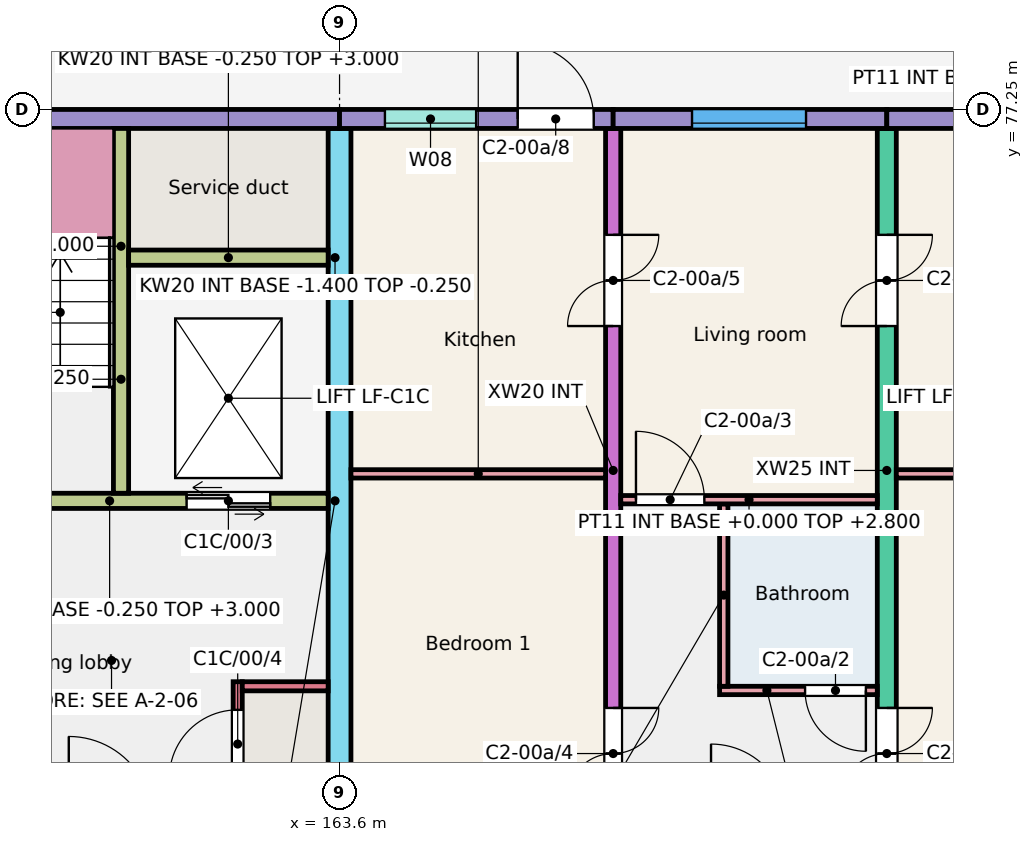
"""IFC4 building model, lengths in metres.
Left out: names, types, materials, properties, quantities, classifications, styles, units other than length and angle.
Written with IfcOpenShell. Run it as: python <this file> out.ifc"""

import sys

from ifc_helpers import new_model, si_unit, direction, frame, frame_2d, origin, place, context, subcontext, project, spatial, rectangle, extrude, element, fill, save


model = new_model("IFC4")
c1 = context("Model", 3, precision=1e-05, world=origin(), true_north=direction((0.0, 1.0)))
c2 = subcontext(c1, "Body", "Model", "MODEL_VIEW")
j1 = project(units=[si_unit("LENGTHUNIT", "METRE"), si_unit("PLANEANGLEUNIT", "RADIAN")], contexts=[c1])
p1 = place(None, origin())
s1 = spatial("IfcSite", under=j1, at=p1, CompositionType="ELEMENT")
p2 = place(p1, origin())
s2 = spatial("IfcBuilding", under=s1, at=p2, CompositionType="ELEMENT")
p3 = place(p2, origin())
s3 = spatial("IfcBuildingStorey", under=s2, at=p3, CompositionType="ELEMENT", Elevation=0.0)
p4 = place(p3, frame((163.6, 66.0, -0.25), z_axis=(0.0, 0.0, 1.0), x_axis=(0.0, 1.0, 0.0)))
e1 = element("IfcWall", 1, at=p4, inside=s3, PredefinedType="SHEAR", context=c2, shape_type="SweptSolid", body=[
    extrude(rectangle(XDim=11.0, YDim=0.3, at=frame_2d((5.5, 0.0))), origin(), (0.0, 0.0, 1.0), 3.25),
])
p5 = place(p4, frame((0.3, 0.0, 0.25)))
e2 = element("IfcOpeningElement", 2, at=p5, cuts=e1, PredefinedType="OPENING", context=c2, shape_type="SweptSolid", body=[
    extrude(rectangle(XDim=1.2, YDim=2.1, at=frame_2d((0.6, 1.05))), frame((0.0, 0.16, 0.0), z_axis=(0.0, -1.0, 0.0), x_axis=(1.0, 0.0, 0.0)), (0.0, 0.0, 1.0), 0.32),
])
p6 = place(p3, frame((167.2, 68.0, -0.25), z_axis=(0.0, 0.0, 1.0), x_axis=(0.0, 1.0, 0.0)))
e3 = element("IfcWall", 3, at=p6, inside=s3, PredefinedType="SHEAR", context=c2, shape_type="SweptSolid", body=[
    extrude(rectangle(XDim=9.0, YDim=0.2, at=frame_2d((4.5, 0.0))), origin(), (0.0, 0.0, 1.0), 3.25),
])
p7 = place(p6, frame((0.175, 0.0, 0.25)))
e4 = element("IfcOpeningElement", 4, at=p7, cuts=e3, PredefinedType="OPENING", context=c2, shape_type="SweptSolid", body=[
    extrude(rectangle(XDim=1.2, YDim=2.1, at=frame_2d((0.6, 1.05))), frame((0.0, 0.11, 0.0), z_axis=(0.0, -1.0, 0.0), x_axis=(1.0, 0.0, 0.0)), (0.0, 0.0, 1.0), 0.22),
])
p8 = place(p6, frame((6.4, 0.0, 0.25)))
e5 = element("IfcOpeningElement", 5, at=p8, cuts=e3, PredefinedType="OPENING", context=c2, shape_type="SweptSolid", body=[
    extrude(rectangle(XDim=1.2, YDim=2.1, at=frame_2d((0.6, 1.05))), frame((0.0, 0.11, 0.0), z_axis=(0.0, -1.0, 0.0), x_axis=(1.0, 0.0, 0.0)), (0.0, 0.0, 1.0), 0.22),
])
p9 = place(p3, frame((170.8, 68.0, -0.25), z_axis=(0.0, 0.0, 1.0), x_axis=(0.0, 1.0, 0.0)))
e6 = element("IfcWall", 6, at=p9, inside=s3, PredefinedType="SHEAR", context=c2, shape_type="SweptSolid", body=[
    extrude(rectangle(XDim=9.0, YDim=0.25, at=frame_2d((4.5, 0.0))), origin(), (0.0, 0.0, 1.0), 3.25),
])
p10 = place(p9, frame((0.175, 0.0, 0.25)))
e7 = element("IfcOpeningElement", 7, at=p10, cuts=e6, PredefinedType="OPENING", context=c2, shape_type="SweptSolid", body=[
    extrude(rectangle(XDim=1.2, YDim=2.1, at=frame_2d((0.6, 1.05))), frame((0.0, 0.135, 0.0), z_axis=(0.0, -1.0, 0.0), x_axis=(1.0, 0.0, 0.0)), (0.0, 0.0, 1.0), 0.27),
])
p11 = place(p9, frame((6.4, 0.0, 0.25)))
e8 = element("IfcOpeningElement", 8, at=p11, cuts=e6, PredefinedType="OPENING", context=c2, shape_type="SweptSolid", body=[
    extrude(rectangle(XDim=1.2, YDim=2.1, at=frame_2d((0.6, 1.05))), frame((0.0, 0.135, 0.0), z_axis=(0.0, -1.0, 0.0), x_axis=(1.0, 0.0, 0.0)), (0.0, 0.0, 1.0), 0.27),
])
p12 = place(p3, frame((157.6, 77.125, -0.25), z_axis=(0.0, 0.0, 1.0), x_axis=(1.0, 0.0, 0.0)))
e9 = element("IfcWall", 9, at=p12, inside=s3, PredefinedType="SOLIDWALL", context=c2, shape_type="SweptSolid", body=[
    extrude(rectangle(XDim=6.0, YDim=0.25, at=frame_2d((3.0, 0.0))), origin(), (0.0, 0.0, 1.0), 3.25),
])
p13 = place(p12, frame((1.025, 0.0, 0.25)))
e10 = element("IfcOpeningElement", 10, at=p13, cuts=e9, PredefinedType="OPENING", context=c2, shape_type="SweptSolid", body=[
    extrude(rectangle(XDim=1.1, YDim=2.1, at=frame_2d((0.55, 1.05))), frame((0.0, 0.135, 0.0), z_axis=(0.0, -1.0, 0.0), x_axis=(1.0, 0.0, 0.0)), (0.0, 0.0, 1.0), 0.27),
])
p14 = place(p3, frame((157.725, 72.1, -0.25), z_axis=(0.0, 0.0, 1.0), x_axis=(1.0, 0.0, 0.0)))
e11 = element("IfcWall", 11, at=p14, inside=s3, PredefinedType="SHEAR", context=c2, shape_type="SweptSolid", body=[
    extrude(rectangle(XDim=5.725, YDim=0.2, at=frame_2d((2.862, 0.0))), origin(), (0.0, 0.0, 1.0), 3.25),
])
p15 = place(p14, frame((0.95, 0.0, 0.25)))
e12 = element("IfcOpeningElement", 12, at=p15, cuts=e11, PredefinedType="OPENING", context=c2, shape_type="SweptSolid", body=[
    extrude(rectangle(XDim=1.0, YDim=2.1, at=frame_2d((0.5, 1.05))), frame((0.0, 0.11, 0.0), z_axis=(0.0, -1.0, 0.0), x_axis=(1.0, 0.0, 0.0)), (0.0, 0.0, 1.0), 0.22),
])
p16 = place(p14, frame((3.863, 0.0, 0.25)))
e13 = element("IfcOpeningElement", 13, at=p16, cuts=e11, PredefinedType="OPENING", context=c2, shape_type="SweptSolid", body=[
    extrude(rectangle(XDim=1.1, YDim=2.1, at=frame_2d((0.55, 1.05))), frame((0.0, 0.11, 0.0), z_axis=(0.0, -1.0, 0.0), x_axis=(1.0, 0.0, 0.0)), (0.0, 0.0, 1.0), 0.22),
])
p17 = place(p3, frame((160.725, 72.2, -0.25), z_axis=(0.0, 0.0, 1.0), x_axis=(0.0, 1.0, 0.0)))
e14 = element("IfcWall", 14, at=p17, inside=s3, PredefinedType="SHEAR", context=c2, shape_type="SweptSolid", body=[
    extrude(rectangle(XDim=4.8, YDim=0.2, at=frame_2d((2.4, 0.0))), origin(), (0.0, 0.0, 1.0), 3.25),
])
p18 = place(p3, frame((160.825, 75.3, -0.25), z_axis=(0.0, 0.0, 1.0), x_axis=(1.0, 0.0, 0.0)))
e15 = element("IfcWall", 15, at=p18, inside=s3, PredefinedType="SHEAR", context=c2, shape_type="SweptSolid", body=[
    extrude(rectangle(XDim=2.625, YDim=0.2, at=frame_2d((1.312, 0.0))), origin(), (0.0, 0.0, 1.0), 3.25),
])
p19 = place(p3, frame((162.26, 68.0, -0.25), z_axis=(0.0, 0.0, 1.0), x_axis=(0.0, 1.0, 0.0)))
e16 = element("IfcWall", 16, at=p19, inside=s3, PredefinedType="SHEAR", context=c2, shape_type="SweptSolid", body=[
    extrude(rectangle(XDim=1.72, YDim=0.12, at=frame_2d((0.86, 0.0))), origin(), (0.0, 0.0, 1.0), 3.25),
])
p20 = place(p19, frame((0.45, 0.0, 0.25)))
e17 = element("IfcOpeningElement", 17, at=p20, cuts=e16, PredefinedType="OPENING", context=c2, shape_type="SweptSolid", body=[
    extrude(rectangle(XDim=0.9, YDim=2.1, at=frame_2d((0.45, 1.05))), frame((0.0, 0.07, 0.0), z_axis=(0.0, -1.0, 0.0), x_axis=(1.0, 0.0, 0.0)), (0.0, 0.0, 1.0), 0.14),
])
p21 = place(p3, frame((162.32, 69.66, -0.25), z_axis=(0.0, 0.0, 1.0), x_axis=(1.0, 0.0, 0.0)))
e18 = element("IfcWall", 18, at=p21, inside=s3, PredefinedType="SHEAR", context=c2, shape_type="SweptSolid", body=[
    extrude(rectangle(XDim=1.13, YDim=0.12, at=frame_2d((0.565, 0.0))), origin(), (0.0, 0.0, 1.0), 3.25),
])
p22 = place(p3, frame((163.6, 77.125, -0.25), z_axis=(0.0, 0.0, 1.0), x_axis=(1.0, 0.0, 0.0)))
e19 = element("IfcWall", 19, at=p22, inside=s3, PredefinedType="SOLIDWALL", context=c2, shape_type="SweptSolid", body=[
    extrude(rectangle(XDim=3.6, YDim=0.25, at=frame_2d((1.8, 0.0))), origin(), (0.0, 0.0, 1.0), 3.25),
])
p23 = place(p22, frame((0.597, 0.0, 1.35)))
e20 = element("IfcOpeningElement", 20, at=p23, cuts=e19, PredefinedType="OPENING", context=c2, shape_type="SweptSolid", body=[
    extrude(rectangle(XDim=1.2, YDim=1.3, at=frame_2d((0.6, 0.65))), frame((0.0, 0.135, 0.0), z_axis=(0.0, -1.0, 0.0), x_axis=(1.0, 0.0, 0.0)), (0.0, 0.0, 1.0), 0.27),
])
p24 = place(p22, frame((2.344, 0.0, 0.25)))
e21 = element("IfcOpeningElement", 21, at=p24, cuts=e19, PredefinedType="OPENING", context=c2, shape_type="SweptSolid", body=[
    extrude(rectangle(XDim=1.0, YDim=2.1, at=frame_2d((0.5, 1.05))), frame((0.0, 0.135, 0.0), z_axis=(0.0, -1.0, 0.0), x_axis=(1.0, 0.0, 0.0)), (0.0, 0.0, 1.0), 0.27),
])
p25 = place(p3, frame((167.2, 77.125, -0.25), z_axis=(0.0, 0.0, 1.0), x_axis=(1.0, 0.0, 0.0)))
e22 = element("IfcWall", 22, at=p25, inside=s3, PredefinedType="SOLIDWALL", context=c2, shape_type="SweptSolid", body=[
    extrude(rectangle(XDim=3.6, YDim=0.25, at=frame_2d((1.8, 0.0))), origin(), (0.0, 0.0, 1.0), 3.25),
])
p26 = place(p25, frame((1.038, 0.0, 1.15)))
e23 = element("IfcOpeningElement", 23, at=p26, cuts=e22, PredefinedType="OPENING", context=c2, shape_type="SweptSolid", body=[
    extrude(rectangle(XDim=1.5, YDim=1.5, at=frame_2d((0.75, 0.75))), frame((0.0, 0.135, 0.0), z_axis=(0.0, -1.0, 0.0), x_axis=(1.0, 0.0, 0.0)), (0.0, 0.0, 1.0), 0.27),
])
p27 = place(p3, frame((170.8, 77.125, -0.25), z_axis=(0.0, 0.0, 1.0), x_axis=(1.0, 0.0, 0.0)))
e24 = element("IfcWall", 24, at=p27, inside=s3, PredefinedType="SOLIDWALL", context=c2, shape_type="SweptSolid", body=[
    extrude(rectangle(XDim=3.6, YDim=0.25, at=frame_2d((1.8, 0.0))), origin(), (0.0, 0.0, 1.0), 3.25),
])
p28 = place(p27, frame((1.05, 0.0, 1.15)))
e25 = element("IfcOpeningElement", 25, at=p28, cuts=e24, PredefinedType="OPENING", context=c2, shape_type="SweptSolid", body=[
    extrude(rectangle(XDim=1.5, YDim=1.5, at=frame_2d((0.75, 0.75))), frame((0.0, 0.135, 0.0), z_axis=(0.0, -1.0, 0.0), x_axis=(1.0, 0.0, 0.0)), (0.0, 0.0, 1.0), 0.27),
])
for number, where, z_axis, x_axis in (
    (26, (160.625, 72.1, -1.4), (0.0, 0.0, 1.0), (1.0, 0.0, 0.0)),
    (27, (160.625, 75.3, -1.4), (0.0, 0.0, 1.0), (1.0, 0.0, 0.0)),
):
    element("IfcWall", number, at=place(p3, frame(where, z_axis=z_axis, x_axis=x_axis)), inside=s3, PredefinedType="SHEAR", context=c2, shape_type="SweptSolid", body=[
        extrude(rectangle(XDim=2.975, YDim=0.2, at=frame_2d((1.488, 0.0))), origin(), (0.0, 0.0, 1.0), 1.15),
    ])
p29 = place(p3, frame((160.725, 72.2, -1.4), z_axis=(0.0, 0.0, 1.0), x_axis=(0.0, 1.0, 0.0)))
e28 = element("IfcWall", 28, at=p29, inside=s3, PredefinedType="SHEAR", context=c2, shape_type="SweptSolid", body=[
    extrude(rectangle(XDim=3.0, YDim=0.2, at=frame_2d((1.5, 0.0))), origin(), (0.0, 0.0, 1.0), 1.15),
])
p30 = place(p3, frame((163.525, 72.2, -1.4), z_axis=(0.0, 0.0, 1.0), x_axis=(0.0, 1.0, 0.0)))
e29 = element("IfcWall", 29, at=p30, inside=s3, PredefinedType="SHEAR", context=c2, shape_type="SweptSolid", body=[
    extrude(rectangle(XDim=3.0, YDim=0.15, at=frame_2d((1.5, 0.0))), origin(), (0.0, 0.0, 1.0), 1.15),
])
p31 = place(p3, frame((168.6, 69.605, 0.0), z_axis=(0.0, 0.0, 1.0), x_axis=(1.0, 0.0, 0.0)))
e30 = element("IfcWall", 30, at=p31, inside=s3, PredefinedType="PARTITIONING", context=c2, shape_type="SweptSolid", body=[
    extrude(rectangle(XDim=2.075, YDim=0.11, at=frame_2d((1.038, 0.0))), origin(), (0.0, 0.0, 1.0), 2.8),
])
p32 = place(p31, frame((1.125, 0.0, 0.0)))
e31 = element("IfcOpeningElement", 31, at=p32, cuts=e30, PredefinedType="OPENING", context=c2, shape_type="SweptSolid", body=[
    extrude(rectangle(XDim=0.8, YDim=2.1, at=frame_2d((0.4, 1.05))), frame((0.0, 0.065, 0.0), z_axis=(0.0, -1.0, 0.0), x_axis=(1.0, 0.0, 0.0)), (0.0, 0.0, 1.0), 0.13),
])
p33 = place(p3, frame((168.655, 69.66, 0.0), z_axis=(0.0, 0.0, 1.0), x_axis=(0.0, 1.0, 0.0)))
e32 = element("IfcWall", 32, at=p33, inside=s3, PredefinedType="PARTITIONING", context=c2, shape_type="SweptSolid", body=[
    extrude(rectangle(XDim=2.4, YDim=0.11, at=frame_2d((1.2, 0.0))), origin(), (0.0, 0.0, 1.0), 2.8),
])
p34 = place(p3, frame((167.3, 72.115, 0.0), z_axis=(0.0, 0.0, 1.0), x_axis=(1.0, 0.0, 0.0)))
e33 = element("IfcWall", 33, at=p34, inside=s3, PredefinedType="PARTITIONING", context=c2, shape_type="SweptSolid", body=[
    extrude(rectangle(XDim=3.375, YDim=0.11, at=frame_2d((1.688, 0.0))), origin(), (0.0, 0.0, 1.0), 2.8),
])
p35 = place(p34, frame((0.2, 0.0, 0.0)))
e34 = element("IfcOpeningElement", 34, at=p35, cuts=e33, PredefinedType="OPENING", context=c2, shape_type="SweptSolid", body=[
    extrude(rectangle(XDim=0.9, YDim=2.1, at=frame_2d((0.45, 1.05))), frame((0.0, 0.065, 0.0), z_axis=(0.0, -1.0, 0.0), x_axis=(1.0, 0.0, 0.0)), (0.0, 0.0, 1.0), 0.13),
])
p36 = place(p3, frame((163.75, 72.455, 0.0), z_axis=(0.0, 0.0, 1.0), x_axis=(1.0, 0.0, 0.0)))
e35 = element("IfcWall", 35, at=p36, inside=s3, PredefinedType="PARTITIONING", context=c2, shape_type="SweptSolid", body=[
    extrude(rectangle(XDim=3.35, YDim=0.11, at=frame_2d((1.675, 0.0))), origin(), (0.0, 0.0, 1.0), 2.8),
])
p37 = place(p3, frame((170.925, 72.455, 0.0), z_axis=(0.0, 0.0, 1.0), x_axis=(1.0, 0.0, 0.0)))
e36 = element("IfcWall", 36, at=p37, inside=s3, PredefinedType="PARTITIONING", context=c2, shape_type="SweptSolid", body=[
    extrude(rectangle(XDim=3.35, YDim=0.11, at=frame_2d((1.675, 0.0))), origin(), (0.0, 0.0, 1.0), 2.8),
])
p38 = place(p23, origin())
e37 = element("IfcWindow", 37, at=p38, inside=s3, PartitioningType="SINGLE_PANEL", PredefinedType="WINDOW", context=c2, shape_type="SweptSolid", body=[
    extrude(rectangle(XDim=1.2, YDim=1.3, at=frame_2d((0.6, 0.65))), frame((0.0, -0.025, 0.0), z_axis=(0.0, -1.0, 0.0), x_axis=(1.0, 0.0, 0.0)), (0.0, 0.0, 1.0), 0.06),
])
fill(e20, e37)
p39 = place(p26, origin())
e38 = element("IfcWindow", 38, at=p39, inside=s3, PartitioningType="SINGLE_PANEL", PredefinedType="WINDOW", context=c2, shape_type="SweptSolid", body=[
    extrude(rectangle(XDim=1.5, YDim=1.5, at=frame_2d((0.75, 0.75))), frame((0.0, -0.025, 0.0), z_axis=(0.0, -1.0, 0.0), x_axis=(1.0, 0.0, 0.0)), (0.0, 0.0, 1.0), 0.06),
])
fill(e23, e38)
p40 = place(p32, origin())
e39 = element("IfcDoor", 39, at=p40, inside=s3, OperationType="SINGLE_SWING_RIGHT", PredefinedType="DOOR", context=c2, shape_type="SweptSolid", body=[
    extrude(rectangle(XDim=0.8, YDim=2.1, at=frame_2d((0.4, 1.05))), frame((0.0, 0.025, 0.0), z_axis=(0.0, -1.0, 0.0), x_axis=(1.0, 0.0, 0.0)), (0.0, 0.0, 1.0), 0.05),
])
fill(e31, e39)
p41 = place(p35, origin())
e40 = element("IfcDoor", 40, at=p41, inside=s3, OperationType="SINGLE_SWING_LEFT", PredefinedType="DOOR", context=c2, shape_type="SweptSolid", body=[
    extrude(rectangle(XDim=0.9, YDim=2.1, at=frame_2d((0.45, 1.05))), frame((0.0, 0.025, 0.0), z_axis=(0.0, -1.0, 0.0), x_axis=(1.0, 0.0, 0.0)), (0.0, 0.0, 1.0), 0.05),
])
fill(e34, e40)
p42 = place(p7, origin())
e41 = element("IfcDoor", 41, at=p42, inside=s3, OperationType="DOUBLE_DOOR_SINGLE_SWING", PredefinedType="DOOR", context=c2, shape_type="SweptSolid", body=[
    extrude(rectangle(XDim=1.2, YDim=2.1, at=frame_2d((0.6, 1.05))), frame((0.0, 0.025, 0.0), z_axis=(0.0, -1.0, 0.0), x_axis=(1.0, 0.0, 0.0)), (0.0, 0.0, 1.0), 0.05),
])
fill(e4, e41)
p43 = place(p8, origin())
e42 = element("IfcDoor", 42, at=p43, inside=s3, OperationType="DOUBLE_DOOR_SINGLE_SWING", PredefinedType="DOOR", context=c2, shape_type="SweptSolid", body=[
    extrude(rectangle(XDim=1.2, YDim=2.1, at=frame_2d((0.6, 1.05))), frame((0.0, 0.025, 0.0), z_axis=(0.0, -1.0, 0.0), x_axis=(1.0, 0.0, 0.0)), (0.0, 0.0, 1.0), 0.05),
])
fill(e5, e42)
p44 = place(p10, origin())
e43 = element("IfcDoor", 43, at=p44, inside=s3, OperationType="DOUBLE_DOOR_SINGLE_SWING", PredefinedType="DOOR", context=c2, shape_type="SweptSolid", body=[
    extrude(rectangle(XDim=1.2, YDim=2.1, at=frame_2d((0.6, 1.05))), frame((0.0, 0.025, 0.0), z_axis=(0.0, -1.0, 0.0), x_axis=(1.0, 0.0, 0.0)), (0.0, 0.0, 1.0), 0.05),
])
fill(e7, e43)
p45 = place(p11, origin())
e44 = element("IfcDoor", 44, at=p45, inside=s3, OperationType="DOUBLE_DOOR_SINGLE_SWING", PredefinedType="DOOR", context=c2, shape_type="SweptSolid", body=[
    extrude(rectangle(XDim=1.2, YDim=2.1, at=frame_2d((0.6, 1.05))), frame((0.0, 0.025, 0.0), z_axis=(0.0, -1.0, 0.0), x_axis=(1.0, 0.0, 0.0)), (0.0, 0.0, 1.0), 0.05),
])
fill(e8, e44)
p46 = place(p24, origin())
e45 = element("IfcDoor", 45, at=p46, inside=s3, OperationType="SINGLE_SWING_LEFT", PredefinedType="DOOR", context=c2, shape_type="SweptSolid", body=[
    extrude(rectangle(XDim=1.0, YDim=2.1, at=frame_2d((0.5, 1.05))), frame((0.0, 0.025, 0.0), z_axis=(0.0, -1.0, 0.0), x_axis=(1.0, 0.0, 0.0)), (0.0, 0.0, 1.0), 0.05),
])
fill(e21, e45)
p47 = place(p16, origin())
e46 = element("IfcDoor", 46, at=p47, inside=s3, OperationType="DOUBLE_DOOR_SLIDING", PredefinedType="DOOR", context=c2, shape_type="SweptSolid", body=[
    extrude(rectangle(XDim=1.1, YDim=2.1, at=frame_2d((0.55, 1.05))), frame((0.0, 0.025, 0.0), z_axis=(0.0, -1.0, 0.0), x_axis=(1.0, 0.0, 0.0)), (0.0, 0.0, 1.0), 0.05),
])
fill(e13, e46)
p48 = place(p20, origin())
e47 = element("IfcDoor", 47, at=p48, inside=s3, OperationType="SINGLE_SWING_LEFT", PredefinedType="DOOR", context=c2, shape_type="SweptSolid", body=[
    extrude(rectangle(XDim=0.9, YDim=2.1, at=frame_2d((0.45, 1.05))), frame((0.0, 0.025, 0.0), z_axis=(0.0, -1.0, 0.0), x_axis=(1.0, 0.0, 0.0)), (0.0, 0.0, 1.0), 0.05),
])
fill(e17, e47)
save(model, sys.argv[1])
